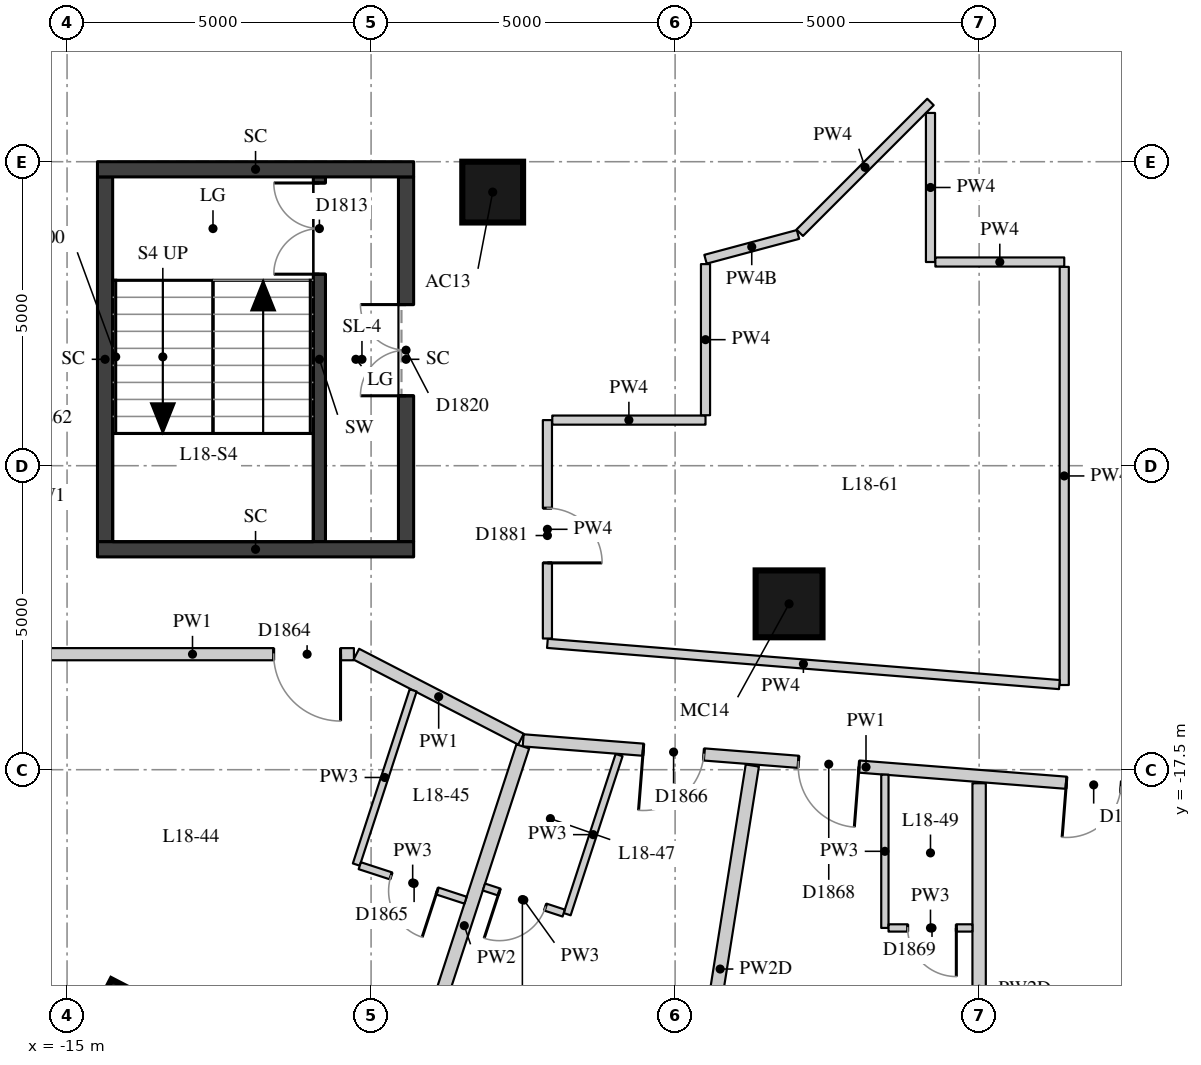
"""IFC4 building model, lengths in metres.
Left out: names, types, materials, properties, quantities, classifications, styles, units other than length and angle.
Written with IfcOpenShell. Run it as: python <this file> out.ifc"""

import sys

from ifc_helpers import new_model, si_unit, direction, frame, frame_2d, origin, origin_2d, place, context, subcontext, project, spatial, rectangle, extrude, element, fill, save


model = new_model("IFC4")
c1 = context("Model", 3, precision=1e-05, world=origin(), true_north=direction((0.0, 1.0)))
c2 = subcontext(c1, "Body", "Model", "MODEL_VIEW")
j1 = project(units=[si_unit("LENGTHUNIT", "METRE"), si_unit("PLANEANGLEUNIT", "RADIAN")], contexts=[c1])
p1 = place(None, origin())
s1 = spatial("IfcSite", under=j1, at=p1, CompositionType="ELEMENT")
p2 = place(p1, origin())
s2 = spatial("IfcBuilding", under=s1, at=p2, CompositionType="ELEMENT")
p3 = place(p2, frame((0.0, 0.0, 67.9)))
s3 = spatial("IfcBuildingStorey", under=s2, at=p3, CompositionType="ELEMENT", Elevation=67.9)
p4 = place(p3, frame((-14.125, -21.867, 0.0), z_axis=(0.0, 0.0, 1.0), x_axis=(-0.459691308511, -0.888078769524, 0.0)))
e1 = element("IfcColumn", 1, at=p4, inside=s3, PredefinedType="COLUMN", context=c2, shape_type="SweptSolid", body=[
    extrude(rectangle(XDim=1.5, YDim=1.1, at=origin_2d()), origin(), (0.0, 0.0, 1.0), 3.3),
])
p5 = place(p3, frame((-8.0, -8.0, 0.0), z_axis=(0.0, 0.0, 1.0), x_axis=(1.0, 0.0, 0.0)))
e2 = element("IfcColumn", 2, at=p5, inside=s3, PredefinedType="COLUMN", context=c2, shape_type="SweptSolid", body=[
    extrude(rectangle(XDim=1.0, YDim=1.0, at=origin_2d()), origin(), (0.0, 0.0, 1.0), 3.3),
])
p6 = place(p3, frame((-3.126, -14.772, 0.0), z_axis=(0.0, 0.0, 1.0), x_axis=(1.0, 0.0, 0.0)))
e3 = element("IfcColumn", 3, at=p6, inside=s3, PredefinedType="COLUMN", context=c2, shape_type="SweptSolid", body=[
    extrude(rectangle(XDim=1.1, YDim=1.1, at=origin_2d()), origin(), (0.0, 0.0, 1.0), 3.3),
])
p7 = place(p3, frame((-18.023, -20.044, 0.0), z_axis=(0.0, 0.0, 1.0), x_axis=(0.847635480093, -0.530579016629, 0.0)))
e4 = element("IfcWall", 4, at=p7, inside=s3, PredefinedType="SOLIDWALL", context=c2, shape_type="SweptSolid", body=[
    extrude(rectangle(XDim=3.782, YDim=0.45, at=frame_2d((1.891, 0.0))), origin(), (0.0, 0.0, 1.0), 3.02),
])
p8 = place(p7, frame((0.791, 0.0, 0.4)))
e5 = element("IfcOpeningElement", 5, at=p8, cuts=e4, PredefinedType="OPENING", context=c2, shape_type="SweptSolid", body=[
    extrude(rectangle(XDim=2.2, YDim=1.75, at=frame_2d((1.1, 0.875))), frame((0.0, 0.235, 0.0), z_axis=(0.0, -1.0, 0.0), x_axis=(1.0, 0.0, 0.0)), (0.0, 0.0, 1.0), 0.47),
])
p9 = place(p3, frame((-10.85, -13.75, 0.0), z_axis=(0.0, 0.0, 1.0), x_axis=(0.0, 1.0, 0.0)))
e6 = element("IfcWall", 6, at=p9, inside=s3, PredefinedType="SHEAR", context=c2, shape_type="SweptSolid", body=[
    extrude(rectangle(XDim=6.0, YDim=0.2, at=frame_2d((3.0, 0.0))), origin(), (0.0, 0.0, 1.0), 3.02),
])
p10 = place(p9, frame((4.4, 0.0, 0.0)))
e7 = element("IfcOpeningElement", 7, at=p10, cuts=e6, PredefinedType="OPENING", context=c2, shape_type="SweptSolid", body=[
    extrude(rectangle(XDim=1.5, YDim=2.1, at=frame_2d((0.75, 1.05))), frame((0.0, 0.11, 0.0), z_axis=(0.0, -1.0, 0.0), x_axis=(1.0, 0.0, 0.0)), (0.0, 0.0, 1.0), 0.22),
])
p11 = place(p3, frame((-14.375, -13.75, -0.28), z_axis=(0.0, 0.0, 1.0), x_axis=(0.0, 1.0, 0.0)))
e8 = element("IfcWall", 8, at=p11, inside=s3, PredefinedType="SHEAR", context=c2, shape_type="SweptSolid", body=[
    extrude(rectangle(XDim=6.0, YDim=0.25, at=frame_2d((3.0, 0.0))), origin(), (0.0, 0.0, 1.0), 3.3),
])
p12 = place(p3, frame((-9.425, -13.75, -0.28), z_axis=(0.0, 0.0, 1.0), x_axis=(0.0, 1.0, 0.0)))
e9 = element("IfcWall", 9, at=p12, inside=s3, PredefinedType="SHEAR", context=c2, shape_type="SweptSolid", body=[
    extrude(rectangle(XDim=6.0, YDim=0.25, at=frame_2d((3.0, 0.0))), origin(), (0.0, 0.0, 1.0), 3.3),
])
p13 = place(p12, frame((2.4, 0.0, 0.28)))
e10 = element("IfcOpeningElement", 10, at=p13, cuts=e9, PredefinedType="OPENING", context=c2, shape_type="SweptSolid", body=[
    extrude(rectangle(XDim=1.5, YDim=2.1, at=frame_2d((0.75, 1.05))), frame((0.0, 0.135, 0.0), z_axis=(0.0, -1.0, 0.0), x_axis=(1.0, 0.0, 0.0)), (0.0, 0.0, 1.0), 0.27),
])
for number, where, z_axis, x_axis in (
    (11, (-14.5, -7.625, -0.28), (0.0, 0.0, 1.0), (1.0, 0.0, 0.0)),
    (12, (-14.5, -13.875, -0.28), (0.0, 0.0, 1.0), (1.0, 0.0, 0.0)),
):
    element("IfcWall", number, at=place(p3, frame(where, z_axis=z_axis, x_axis=x_axis)), inside=s3, PredefinedType="SHEAR", context=c2, shape_type="SweptSolid", body=[
        extrude(rectangle(XDim=5.2, YDim=0.25, at=frame_2d((2.6, 0.0))), origin(), (0.0, 0.0, 1.0), 3.3),
    ])
p14 = place(p3, frame((3.778, -17.898, 0.0), z_axis=(0.0, 0.0, 1.0), x_axis=(-0.996963005503, 0.077876605336, 0.0)))
e13 = element("IfcWall", 13, at=p14, inside=s3, PredefinedType="PARTITIONING", context=c2, shape_type="SweptSolid", body=[
    extrude(rectangle(XDim=11.311, YDim=0.2, at=frame_2d((5.656, 0.0))), origin(), (0.0, 0.0, 1.0), 3.02),
])
p15 = place(p14, frame((8.33, 0.0, 0.0)))
e14 = element("IfcOpeningElement", 14, at=p15, cuts=e13, PredefinedType="OPENING", context=c2, shape_type="SweptSolid", body=[
    extrude(rectangle(XDim=1.0, YDim=2.1, at=frame_2d((0.5, 1.05))), frame((0.0, 0.11, 0.0), z_axis=(0.0, -1.0, 0.0), x_axis=(1.0, 0.0, 0.0)), (0.0, 0.0, 1.0), 0.22),
])
p16 = place(p14, frame((5.77, 0.0, 0.0)))
e15 = element("IfcOpeningElement", 15, at=p16, cuts=e13, PredefinedType="OPENING", context=c2, shape_type="SweptSolid", body=[
    extrude(rectangle(XDim=1.0, YDim=2.1, at=frame_2d((0.5, 1.05))), frame((0.0, 0.11, 0.0), z_axis=(0.0, -1.0, 0.0), x_axis=(1.0, 0.0, 0.0)), (0.0, 0.0, 1.0), 0.22),
])
p17 = place(p14, frame((1.45, 0.0, 0.0)))
e16 = element("IfcOpeningElement", 16, at=p17, cuts=e13, PredefinedType="OPENING", context=c2, shape_type="SweptSolid", body=[
    extrude(rectangle(XDim=0.9, YDim=2.1, at=frame_2d((0.45, 1.05))), frame((0.0, 0.11, 0.0), z_axis=(0.0, -1.0, 0.0), x_axis=(1.0, 0.0, 0.0)), (0.0, 0.0, 1.0), 0.22),
])
p18 = place(p3, frame((-7.534, -16.998, 0.0), z_axis=(0.0, 0.0, 1.0), x_axis=(-0.888535328052, 0.458808206992, 0.0)))
e17 = element("IfcWall", 17, at=p18, inside=s3, PredefinedType="PARTITIONING", context=c2, shape_type="SweptSolid", body=[
    extrude(rectangle(XDim=3.047, YDim=0.2, at=frame_2d((1.524, 0.0))), origin(), (0.0, 0.0, 1.0), 3.02),
])
p19 = place(p3, frame((-10.282, -15.6, 0.0), z_axis=(0.0, 0.0, 1.0), x_axis=(-1.0, 0.0, 0.0)))
e18 = element("IfcWall", 18, at=p19, inside=s3, PredefinedType="PARTITIONING", context=c2, shape_type="SweptSolid", body=[
    extrude(rectangle(XDim=5.309, YDim=0.2, at=frame_2d((2.655, 0.0))), origin(), (0.0, 0.0, 1.0), 3.02),
])
p20 = place(p19, frame((0.22, 0.0, 0.0)))
e19 = element("IfcOpeningElement", 19, at=p20, cuts=e18, PredefinedType="OPENING", context=c2, shape_type="SweptSolid", body=[
    extrude(rectangle(XDim=1.1, YDim=2.1, at=frame_2d((0.55, 1.05))), frame((0.0, 0.11, 0.0), z_axis=(0.0, -1.0, 0.0), x_axis=(1.0, 0.0, 0.0)), (0.0, 0.0, 1.0), 0.22),
])
p21 = place(p3, frame((-4.5, -9.104, 0.0), z_axis=(0.0, 0.0, 1.0), x_axis=(0.965938363316, 0.258772251746, 0.0)))
e20 = element("IfcWall", 20, at=p21, inside=s3, PredefinedType="PARTITIONING", context=c2, shape_type="SweptSolid", body=[
    extrude(rectangle(XDim=1.575, YDim=0.15, at=frame_2d((0.787, 0.0))), origin(), (0.0, 0.0, 1.0), 2.47),
])
p22 = place(p3, frame((-2.951, -8.668, 0.0), z_axis=(0.0, 0.0, 1.0), x_axis=(0.707106781187, 0.707106781187, 0.0)))
e21 = element("IfcWall", 21, at=p22, inside=s3, PredefinedType="PARTITIONING", context=c2, shape_type="SweptSolid", body=[
    extrude(rectangle(XDim=3.042, YDim=0.15, at=frame_2d((1.521, 0.0))), origin(), (0.0, 0.0, 1.0), 3.02),
])
p23 = place(p3, frame((-0.8, -6.698, 0.0), z_axis=(0.0, 0.0, 1.0), x_axis=(0.0, -1.0, 0.0)))
e22 = element("IfcWall", 22, at=p23, inside=s3, PredefinedType="PARTITIONING", context=c2, shape_type="SweptSolid", body=[
    extrude(rectangle(XDim=2.452, YDim=0.15, at=frame_2d((1.226, 0.0))), origin(), (0.0, 0.0, 1.0), 3.02),
])
p24 = place(p3, frame((-0.72, -9.15, 0.0), z_axis=(0.0, 0.0, 1.0), x_axis=(1.0, 0.0, 0.0)))
e23 = element("IfcWall", 23, at=p24, inside=s3, PredefinedType="PARTITIONING", context=c2, shape_type="SweptSolid", body=[
    extrude(rectangle(XDim=2.12, YDim=0.15, at=frame_2d((1.06, 0.0))), origin(), (0.0, 0.0, 1.0), 3.02),
])
p25 = place(p3, frame((1.4, -9.23, 0.0), z_axis=(0.0, 0.0, 1.0), x_axis=(0.0, -1.0, 0.0)))
e24 = element("IfcWall", 24, at=p25, inside=s3, PredefinedType="PARTITIONING", context=c2, shape_type="SweptSolid", body=[
    extrude(rectangle(XDim=6.877, YDim=0.15, at=frame_2d((3.438, 0.0))), origin(), (0.0, 0.0, 1.0), 3.02),
])
p26 = place(p3, frame((1.32, -16.1, 0.0), z_axis=(0.0, 0.0, 1.0), x_axis=(-0.996773882711, 0.080260991426, 0.0)))
e25 = element("IfcWall", 25, at=p26, inside=s3, PredefinedType="PARTITIONING", context=c2, shape_type="SweptSolid", body=[
    extrude(rectangle(XDim=8.447, YDim=0.15, at=frame_2d((4.224, 0.0))), origin(), (0.0, 0.0, 1.0), 3.02),
])
p27 = place(p3, frame((-7.1, -15.342, 0.0), z_axis=(0.0, 0.0, 1.0), x_axis=(0.0, 1.0, 0.0)))
e26 = element("IfcWall", 26, at=p27, inside=s3, PredefinedType="PARTITIONING", context=c2, shape_type="SweptSolid", body=[
    extrude(rectangle(XDim=3.592, YDim=0.15, at=frame_2d((1.796, 0.0))), origin(), (0.0, 0.0, 1.0), 3.02),
])
p28 = place(p27, frame((1.244, 0.0, 0.0)))
e27 = element("IfcOpeningElement", 27, at=p28, cuts=e26, PredefinedType="OPENING", context=c2, shape_type="SweptSolid", body=[
    extrude(rectangle(XDim=0.9, YDim=2.1, at=frame_2d((0.45, 1.05))), frame((0.0, 0.085, 0.0), z_axis=(0.0, -1.0, 0.0), x_axis=(1.0, 0.0, 0.0)), (0.0, 0.0, 1.0), 0.17),
])
p29 = place(p3, frame((-7.02, -11.75, 0.0), z_axis=(0.0, 0.0, 1.0), x_axis=(1.0, 0.0, 0.0)))
e28 = element("IfcWall", 28, at=p29, inside=s3, PredefinedType="PARTITIONING", context=c2, shape_type="SweptSolid", body=[
    extrude(rectangle(XDim=2.52, YDim=0.15, at=frame_2d((1.26, 0.0))), origin(), (0.0, 0.0, 1.0), 3.02),
])
p30 = place(p3, frame((-4.5, -11.67, 0.0), z_axis=(0.0, 0.0, 1.0), x_axis=(0.0, 1.0, 0.0)))
e29 = element("IfcWall", 29, at=p30, inside=s3, PredefinedType="PARTITIONING", context=c2, shape_type="SweptSolid", body=[
    extrude(rectangle(XDim=2.486, YDim=0.15, at=frame_2d((1.243, 0.0))), origin(), (0.0, 0.0, 1.0), 3.02),
])
p31 = place(p3, frame((-9.429, -23.014, 0.0), z_axis=(0.0, 0.0, 1.0), x_axis=(0.310235573501, 0.950659712481, 0.0)))
e30 = element("IfcWall", 30, at=p31, inside=s3, PredefinedType="PARTITIONING", context=c2, shape_type="SweptSolid", body=[
    extrude(rectangle(XDim=6.204, YDim=0.22, at=frame_2d((3.102, 0.0))), origin(), (0.0, 0.0, 1.0), 3.02),
])
for number, where, z_axis, x_axis in (
    (31, (-4.788, -24.125, 0.0), (0.0, 0.0, 1.0), (0.156, 0.988, 0.0)),
    (32, (0.0, -24.5, 0.0), (0.0, 0.0, 1.0), (0.0, 1.0, 0.0)),
):
    element("IfcWall", number, at=place(p3, frame(where, z_axis=z_axis, x_axis=x_axis)), inside=s3, PredefinedType="PARTITIONING", context=c2, shape_type="SweptSolid", body=[
        extrude(rectangle(XDim=6.777, YDim=0.22, at=frame_2d((3.389, 0.0))), origin(), (0.0, 0.0, 1.0), 2.47),
    ])
p32 = place(p3, frame((-9.308, -16.195, 0.0), z_axis=(0.0, 0.0, 1.0), x_axis=(-0.310170219214, -0.950681037527, 0.0)))
e33 = element("IfcWall", 33, at=p32, inside=s3, PredefinedType="PARTITIONING", context=c2, shape_type="SweptSolid", body=[
    extrude(rectangle(XDim=3.014, YDim=0.12, at=frame_2d((1.507, 0.0))), origin(), (0.0, 0.0, 1.0), 3.02),
])
p33 = place(p3, frame((-5.921, -17.26, 0.0), z_axis=(0.0, 0.0, 1.0), x_axis=(-0.310180943487, -0.950677538547, 0.0)))
e34 = element("IfcWall", 34, at=p33, inside=s3, PredefinedType="PARTITIONING", context=c2, shape_type="SweptSolid", body=[
    extrude(rectangle(XDim=2.752, YDim=0.12, at=frame_2d((1.376, 0.0))), origin(), (0.0, 0.0, 1.0), 3.02),
])
p34 = place(p3, frame((-1.55, -17.582, 0.0), z_axis=(0.0, 0.0, 1.0), x_axis=(0.0, -1.0, 0.0)))
e35 = element("IfcWall", 35, at=p34, inside=s3, PredefinedType="PARTITIONING", context=c2, shape_type="SweptSolid", body=[
    extrude(rectangle(XDim=2.521, YDim=0.12, at=frame_2d((1.26, 0.0))), origin(), (0.0, 0.0, 1.0), 3.02),
])
p35 = place(p3, frame((-10.186, -19.079, 0.0), z_axis=(0.0, 0.0, 1.0), x_axis=(0.950678536911, -0.31017788357, 0.0)))
e36 = element("IfcWall", 36, at=p35, inside=s3, PredefinedType="PARTITIONING", context=c2, shape_type="SweptSolid", body=[
    extrude(rectangle(XDim=1.83, YDim=0.12, at=frame_2d((0.915, 0.0))), origin(), (0.0, 0.0, 1.0), 3.02),
])
p36 = place(p35, frame((0.54, 0.0, 0.0)))
e37 = element("IfcOpeningElement", 37, at=p36, cuts=e36, PredefinedType="OPENING", context=c2, shape_type="SweptSolid", body=[
    extrude(rectangle(XDim=0.8, YDim=2.1, at=frame_2d((0.4, 1.05))), frame((0.0, 0.07, 0.0), z_axis=(0.0, -1.0, 0.0), x_axis=(1.0, 0.0, 0.0)), (0.0, 0.0, 1.0), 0.14),
])
p37 = place(p3, frame((-6.832, -19.858, 0.0), z_axis=(0.0, 0.0, 1.0), x_axis=(-0.950645927723, 0.31027781117, 0.0)))
e38 = element("IfcWall", 38, at=p37, inside=s3, PredefinedType="PARTITIONING", context=c2, shape_type="SweptSolid", body=[
    extrude(rectangle(XDim=1.38, YDim=0.12, at=frame_2d((0.69, 0.0))), origin(), (0.0, 0.0, 1.0), 3.02),
])
p38 = place(p37, frame((0.315, 0.0, 0.0)))
e39 = element("IfcOpeningElement", 39, at=p38, cuts=e38, PredefinedType="OPENING", context=c2, shape_type="SweptSolid", body=[
    extrude(rectangle(XDim=0.8, YDim=2.1, at=frame_2d((0.4, 1.05))), frame((0.0, 0.07, 0.0), z_axis=(0.0, -1.0, 0.0), x_axis=(1.0, 0.0, 0.0)), (0.0, 0.0, 1.0), 0.14),
])
p39 = place(p3, frame((-1.49, -20.103, 0.0), z_axis=(0.0, 0.0, 1.0), x_axis=(1.0, 0.0, 0.0)))
e40 = element("IfcWall", 40, at=p39, inside=s3, PredefinedType="PARTITIONING", context=c2, shape_type="SweptSolid", body=[
    extrude(rectangle(XDim=1.38, YDim=0.12, at=frame_2d((0.69, 0.0))), origin(), (0.0, 0.0, 1.0), 3.02),
])
p40 = place(p39, frame((0.315, 0.0, 0.0)))
e41 = element("IfcOpeningElement", 41, at=p40, cuts=e40, PredefinedType="OPENING", context=c2, shape_type="SweptSolid", body=[
    extrude(rectangle(XDim=0.8, YDim=2.1, at=frame_2d((0.4, 1.05))), frame((0.0, 0.07, 0.0), z_axis=(0.0, -1.0, 0.0), x_axis=(1.0, 0.0, 0.0)), (0.0, 0.0, 1.0), 0.14),
])
p41 = place(p10, origin())
e42 = element("IfcDoor", 42, at=p41, inside=s3, OperationType="DOUBLE_DOOR_SINGLE_SWING", PredefinedType="DOOR", context=c2, shape_type="SweptSolid", body=[
    extrude(rectangle(XDim=1.5, YDim=2.1, at=frame_2d((0.75, 1.05))), frame((0.0, 0.025, 0.0), z_axis=(0.0, -1.0, 0.0), x_axis=(1.0, 0.0, 0.0)), (0.0, 0.0, 1.0), 0.05),
])
fill(e7, e42)
p42 = place(p13, origin())
e43 = element("IfcDoor", 43, at=p42, inside=s3, OperationType="DOUBLE_DOOR_SINGLE_SWING", PredefinedType="DOOR", context=c2, shape_type="SweptSolid", body=[
    extrude(rectangle(XDim=1.5, YDim=2.1, at=frame_2d((0.75, 1.05))), frame((0.0, 0.025, 0.0), z_axis=(0.0, -1.0, 0.0), x_axis=(1.0, 0.0, 0.0)), (0.0, 0.0, 1.0), 0.05),
])
fill(e10, e43)
p43 = place(p20, origin())
e44 = element("IfcDoor", 44, at=p43, inside=s3, OperationType="SINGLE_SWING_LEFT", PredefinedType="DOOR", context=c2, shape_type="SweptSolid", body=[
    extrude(rectangle(XDim=1.1, YDim=2.1, at=frame_2d((0.55, 1.05))), frame((0.0, 0.025, 0.0), z_axis=(0.0, -1.0, 0.0), x_axis=(1.0, 0.0, 0.0)), (0.0, 0.0, 1.0), 0.05),
])
fill(e19, e44)
p44 = place(p36, origin())
e45 = element("IfcDoor", 45, at=p44, inside=s3, OperationType="SINGLE_SWING_LEFT", PredefinedType="DOOR", context=c2, shape_type="SweptSolid", body=[
    extrude(rectangle(XDim=0.8, YDim=2.1, at=frame_2d((0.4, 1.05))), frame((0.0, 0.025, 0.0), z_axis=(0.0, -1.0, 0.0), x_axis=(1.0, 0.0, 0.0)), (0.0, 0.0, 1.0), 0.05),
])
fill(e37, e45)
p45 = place(p15, origin())
e46 = element("IfcDoor", 46, at=p45, inside=s3, OperationType="SINGLE_SWING_RIGHT", PredefinedType="DOOR", context=c2, shape_type="SweptSolid", body=[
    extrude(rectangle(XDim=1.0, YDim=2.1, at=frame_2d((0.5, 1.05))), frame((0.0, 0.025, 0.0), z_axis=(0.0, -1.0, 0.0), x_axis=(1.0, 0.0, 0.0)), (0.0, 0.0, 1.0), 0.05),
])
fill(e14, e46)
p46 = place(p38, origin())
e47 = element("IfcDoor", 47, at=p46, inside=s3, OperationType="SINGLE_SWING_RIGHT", PredefinedType="DOOR", context=c2, shape_type="SweptSolid", body=[
    extrude(rectangle(XDim=0.8, YDim=2.1, at=frame_2d((0.4, 1.05))), frame((0.0, 0.025, 0.0), z_axis=(0.0, -1.0, 0.0), x_axis=(1.0, 0.0, 0.0)), (0.0, 0.0, 1.0), 0.05),
])
fill(e39, e47)
p47 = place(p16, origin())
e48 = element("IfcDoor", 48, at=p47, inside=s3, OperationType="SINGLE_SWING_LEFT", PredefinedType="DOOR", context=c2, shape_type="SweptSolid", body=[
    extrude(rectangle(XDim=1.0, YDim=2.1, at=frame_2d((0.5, 1.05))), frame((0.0, 0.025, 0.0), z_axis=(0.0, -1.0, 0.0), x_axis=(1.0, 0.0, 0.0)), (0.0, 0.0, 1.0), 0.05),
])
fill(e15, e48)
p48 = place(p40, origin())
e49 = element("IfcDoor", 49, at=p48, inside=s3, OperationType="SINGLE_SWING_LEFT", PredefinedType="DOOR", context=c2, shape_type="SweptSolid", body=[
    extrude(rectangle(XDim=0.8, YDim=2.1, at=frame_2d((0.4, 1.05))), frame((0.0, 0.025, 0.0), z_axis=(0.0, -1.0, 0.0), x_axis=(1.0, 0.0, 0.0)), (0.0, 0.0, 1.0), 0.05),
])
fill(e41, e49)
p49 = place(p17, origin())
e50 = element("IfcDoor", 50, at=p49, inside=s3, OperationType="SINGLE_SWING_RIGHT", PredefinedType="DOOR", context=c2, shape_type="SweptSolid", body=[
    extrude(rectangle(XDim=0.9, YDim=2.1, at=frame_2d((0.45, 1.05))), frame((0.0, 0.025, 0.0), z_axis=(0.0, -1.0, 0.0), x_axis=(1.0, 0.0, 0.0)), (0.0, 0.0, 1.0), 0.05),
])
fill(e16, e50)
p50 = place(p28, origin())
e51 = element("IfcDoor", 51, at=p50, inside=s3, OperationType="SINGLE_SWING_RIGHT", PredefinedType="DOOR", context=c2, shape_type="SweptSolid", body=[
    extrude(rectangle(XDim=0.9, YDim=2.1, at=frame_2d((0.45, 1.05))), frame((0.0, 0.025, 0.0), z_axis=(0.0, -1.0, 0.0), x_axis=(1.0, 0.0, 0.0)), (0.0, 0.0, 1.0), 0.05),
])
fill(e27, e51)
save(model, sys.argv[1])
